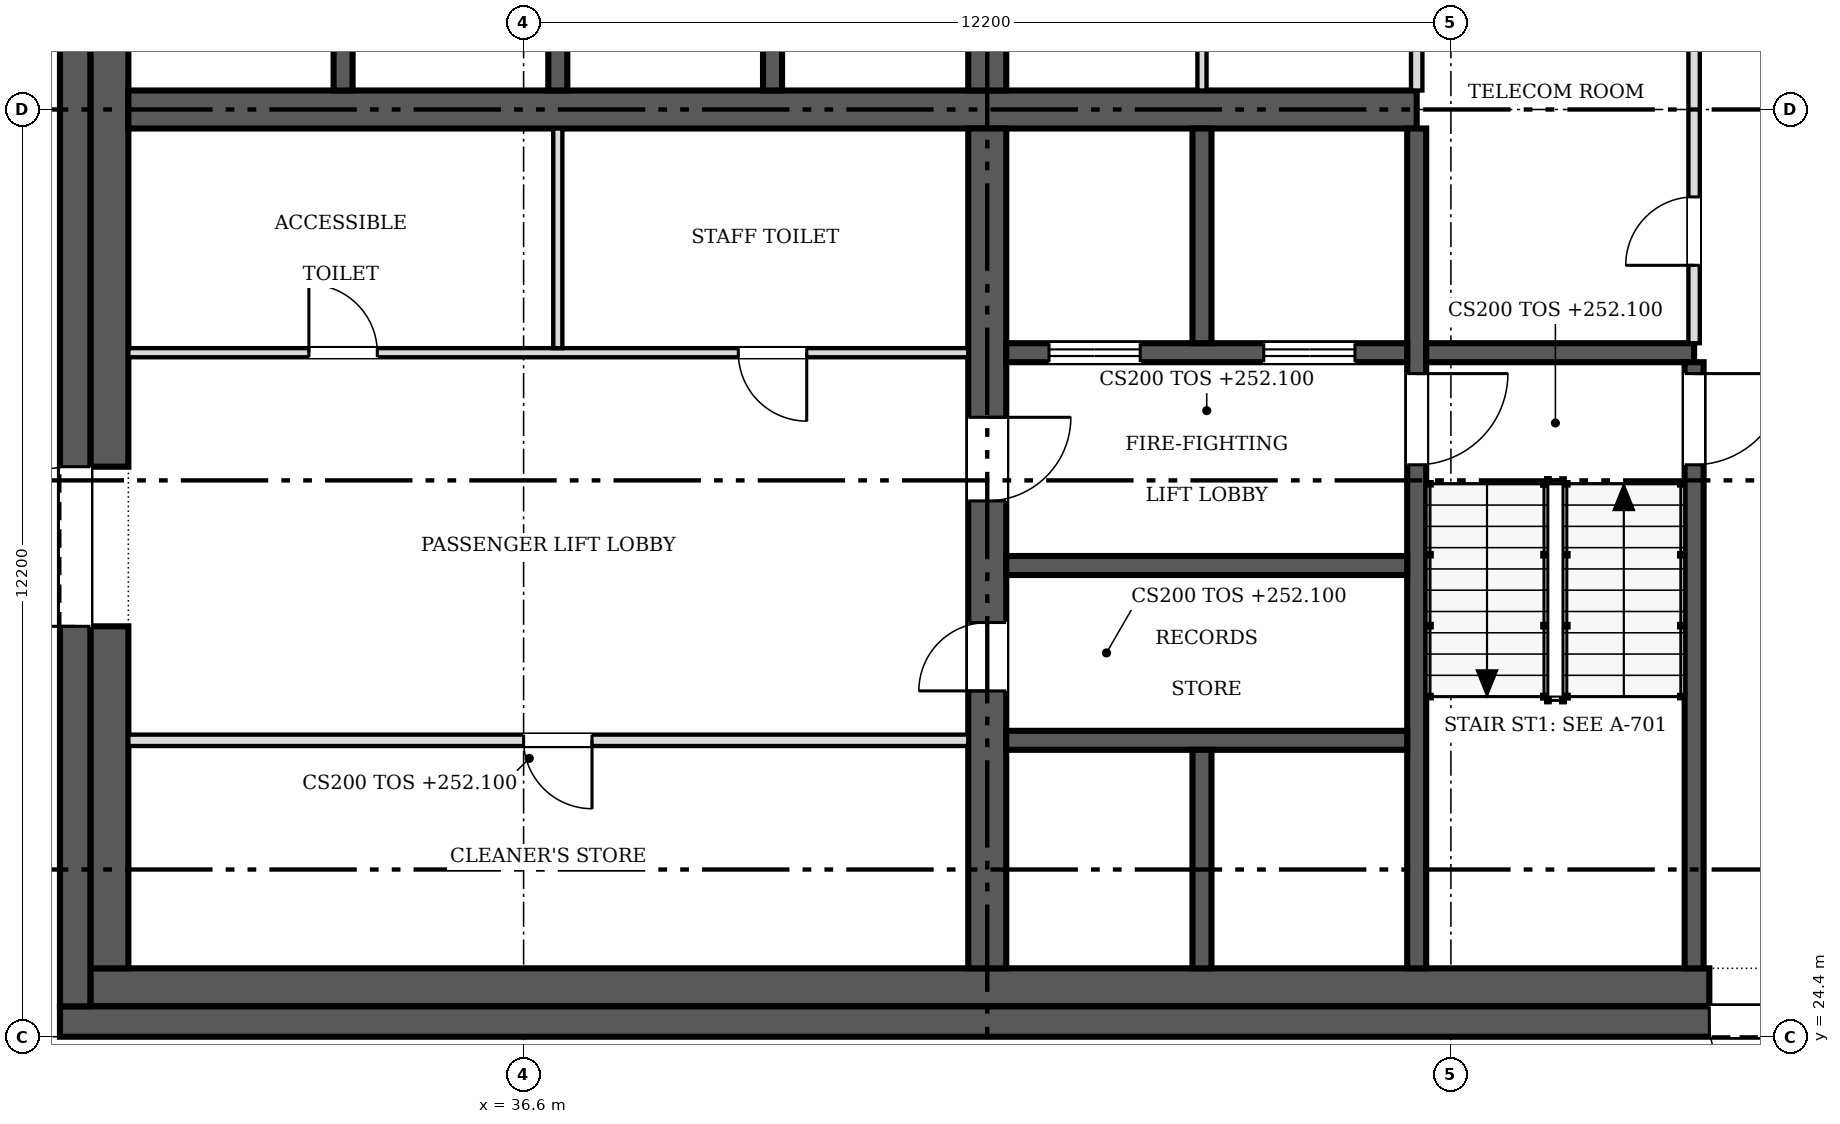
"""IFC4 building model, lengths in metres.
Left out: names, types, materials, properties, quantities, classifications, styles, units other than length and angle.
Written with IfcOpenShell. Run it as: python <this file> out.ifc"""

import sys

from ifc_helpers import new_model, si_unit, direction, frame, frame_2d, origin, place, context, subcontext, project, spatial, rectangle, extrude, source, transform, mapped, element, fill, save


model = new_model("IFC4")
c1 = context("Model", 3, precision=1e-05, world=origin(), true_north=direction((0.0, 1.0)))
c2 = subcontext(c1, "Body", "Model", "MODEL_VIEW")
j1 = project(units=[si_unit("LENGTHUNIT", "METRE"), si_unit("PLANEANGLEUNIT", "RADIAN")], contexts=[c1])
p1 = place(None, origin())
s1 = spatial("IfcSite", under=j1, at=p1, CompositionType="ELEMENT")
p2 = place(p1, origin())
s2 = spatial("IfcBuilding", under=s1, at=p2, CompositionType="ELEMENT")
p3 = place(p2, frame((0.0, 0.0, 252.1)))
s3 = spatial("IfcBuildingStorey", under=s2, at=p3, CompositionType="ELEMENT", Elevation=252.1)
p4 = place(p3, frame((54.9, 24.6, 0.0), z_axis=(0.0, 0.0, 1.0), x_axis=(-1.0, 0.0, 0.0)))
e1 = element("IfcWall", 1, at=p4, inside=s3, PredefinedType="SHEAR", context=c2, shape_type="SweptSolid", body=[
    extrude(rectangle(XDim=24.4, YDim=0.4, at=frame_2d((12.2, 0.0))), origin(), (0.0, 0.0, 1.0), 3.8),
])
m1 = source(origin(), c2, "Body", "SweptSolid", [
    extrude(rectangle(XDim=1.2, YDim=2.1, at=frame_2d((0.6, 1.05))), frame((0.0, 0.21, 0.0), z_axis=(0.0, -1.0, 0.0), x_axis=(1.0, 0.0, 0.0)), (0.0, 0.0, 1.0), 0.42),
])
p5 = place(p4, frame((1.5, 0.0, 0.0)))
e2 = element("IfcOpeningElement", 2, at=p5, cuts=e1, PredefinedType="OPENING", context=c2, shape_type="MappedRepresentation", body=[
    mapped(m1, transform((0.0, 0.0, 0.0), scale=1.0)),
])
p6 = place(p3, frame((30.7, 24.8, 0.0), z_axis=(0.0, 0.0, 1.0), x_axis=(0.0, 1.0, 0.0)))
e3 = element("IfcWall", 3, at=p6, inside=s3, PredefinedType="SHEAR", context=c2, shape_type="SweptSolid", body=[
    extrude(rectangle(XDim=23.6, YDim=0.4, at=frame_2d((11.8, 0.0))), origin(), (0.0, 0.0, 1.0), 3.8),
])
m2 = source(origin(), c2, "Body", "SweptSolid", [
    extrude(rectangle(XDim=2.1, YDim=2.4, at=frame_2d((1.05, 1.2))), frame((0.0, 0.21, 0.0), z_axis=(0.0, -1.0, 0.0), x_axis=(1.0, 0.0, 0.0)), (0.0, 0.0, 1.0), 0.42),
])
p7 = place(p6, frame((5.0, 0.0, 0.0)))
e4 = element("IfcOpeningElement", 4, at=p7, cuts=e3, PredefinedType="OPENING", context=c2, shape_type="MappedRepresentation", body=[
    mapped(m2, transform((0.0, 0.0, 0.0), scale=1.0)),
])
p8 = place(p6, frame((16.5, 0.0, 0.0)))
e5 = element("IfcOpeningElement", 5, at=p8, cuts=e3, PredefinedType="OPENING", context=c2, shape_type="MappedRepresentation", body=[
    mapped(m2, transform((0.0, 0.0, 0.0), scale=1.0)),
])
p9 = place(p3, frame((30.9, 25.05, 0.0), z_axis=(0.0, 0.0, 1.0), x_axis=(1.0, 0.0, 0.0)))
e6 = element("IfcWall", 6, at=p9, inside=s3, PredefinedType="SOLIDWALL", context=c2, shape_type="SweptSolid", body=[
    extrude(rectangle(XDim=21.3, YDim=0.5, at=frame_2d((10.65, 0.0))), origin(), (0.0, 0.0, 1.0), 3.8),
])
p10 = place(p3, frame((31.15, 25.3, 0.0), z_axis=(0.0, 0.0, 1.0), x_axis=(0.0, 1.0, 0.0)))
e7 = element("IfcWall", 7, at=p10, inside=s3, PredefinedType="SOLIDWALL", context=c2, shape_type="SweptSolid", body=[
    extrude(rectangle(XDim=4.5, YDim=0.5, at=frame_2d((2.25, 0.0))), origin(), (0.0, 0.0, 1.0), 3.8),
])
p11 = place(p3, frame((31.15, 31.9, 0.0), z_axis=(0.0, 0.0, 1.0), x_axis=(0.0, 1.0, 0.0)))
e8 = element("IfcWall", 8, at=p11, inside=s3, PredefinedType="SOLIDWALL", context=c2, shape_type="SweptSolid", body=[
    extrude(rectangle(XDim=9.4, YDim=0.5, at=frame_2d((4.7, 0.0))), origin(), (0.0, 0.0, 1.0), 3.8),
])
p12 = place(p3, frame((31.4, 36.6, 0.0), z_axis=(0.0, 0.0, 1.0), x_axis=(1.0, 0.0, 0.0)))
e9 = element("IfcWall", 9, at=p12, inside=s3, PredefinedType="SHEAR", context=c2, shape_type="SweptSolid", body=[
    extrude(rectangle(XDim=16.95, YDim=0.5, at=frame_2d((8.475, 0.0))), origin(), (0.0, 0.0, 1.0), 3.8),
])
p13 = place(p3, frame((42.7, 36.35, 0.0), z_axis=(0.0, 0.0, 1.0), x_axis=(0.0, -1.0, 0.0)))
e10 = element("IfcWall", 10, at=p13, inside=s3, PredefinedType="SHEAR", context=c2, shape_type="SweptSolid", body=[
    extrude(rectangle(XDim=11.05, YDim=0.5, at=frame_2d((5.525, 0.0))), origin(), (0.0, 0.0, 1.0), 3.8),
])
m3 = source(origin(), c2, "Body", "SweptSolid", [
    extrude(rectangle(XDim=0.9, YDim=2.1, at=frame_2d((0.45, 1.05))), frame((0.0, 0.26, 0.0), z_axis=(0.0, -1.0, 0.0), x_axis=(1.0, 0.0, 0.0)), (0.0, 0.0, 1.0), 0.52),
])
p14 = place(p13, frame((6.5, 0.0, 0.0)))
e11 = element("IfcOpeningElement", 11, at=p14, cuts=e10, PredefinedType="OPENING", context=c2, shape_type="MappedRepresentation", body=[
    mapped(m3, transform((0.0, 0.0, 0.0), scale=1.0)),
])
m4 = source(origin(), c2, "Body", "SweptSolid", [
    extrude(rectangle(XDim=1.1, YDim=2.1, at=frame_2d((0.55, 1.05))), frame((0.0, 0.26, 0.0), z_axis=(0.0, -1.0, 0.0), x_axis=(1.0, 0.0, 0.0)), (0.0, 0.0, 1.0), 0.52),
])
p15 = place(p13, frame((3.8, 0.0, 0.0)))
e12 = element("IfcOpeningElement", 12, at=p15, cuts=e10, PredefinedType="OPENING", context=c2, shape_type="MappedRepresentation", body=[
    mapped(m4, transform((0.0, 0.0, 0.0), scale=1.0)),
])
p16 = place(p3, frame((42.7, 36.85, 0.0), z_axis=(0.0, 0.0, 1.0), x_axis=(0.0, 1.0, 0.0)))
e13 = element("IfcWall", 13, at=p16, inside=s3, PredefinedType="SHEAR", context=c2, shape_type="SweptSolid", body=[
    extrude(rectangle(XDim=2.95, YDim=0.5, at=frame_2d((1.475, 0.0))), origin(), (0.0, 0.0, 1.0), 3.8),
])
p17 = place(p3, frame((48.35, 36.35, 0.0), z_axis=(0.0, 0.0, 1.0), x_axis=(0.0, -1.0, 0.0)))
e14 = element("IfcWall", 14, at=p17, inside=s3, PredefinedType="SOLIDWALL", context=c2, shape_type="SweptSolid", body=[
    extrude(rectangle(XDim=11.05, YDim=0.25, at=frame_2d((5.525, 0.0))), origin(), (0.0, 0.0, 1.0), 3.8),
])
m5 = source(origin(), c2, "Body", "SweptSolid", [
    extrude(rectangle(XDim=1.2, YDim=2.1, at=frame_2d((0.6, 1.05))), frame((0.0, 0.135, 0.0), z_axis=(0.0, -1.0, 0.0), x_axis=(1.0, 0.0, 0.0)), (0.0, 0.0, 1.0), 0.27),
])
p18 = place(p17, frame((3.225, 0.0, 0.0)))
e15 = element("IfcOpeningElement", 15, at=p18, cuts=e14, PredefinedType="OPENING", context=c2, shape_type="MappedRepresentation", body=[
    mapped(m5, transform((0.0, 0.0, 0.0), scale=1.0)),
])
p19 = place(p3, frame((48.225, 33.4, 0.0), z_axis=(0.0, 0.0, 1.0), x_axis=(-1.0, 0.0, 0.0)))
e16 = element("IfcWall", 16, at=p19, inside=s3, PredefinedType="SOLIDWALL", context=c2, shape_type="SweptSolid", body=[
    extrude(rectangle(XDim=5.275, YDim=0.25, at=frame_2d((2.638, 0.0))), origin(), (0.0, 0.0, 1.0), 3.8),
])
p20 = place(p19, frame((3.512, 0.0, 0.0)))
e17 = element("IfcOpeningElement", 17, at=p20, cuts=e16, PredefinedType="OPENING", context=c2, shape_type="MappedRepresentation", body=[
    mapped(m5, transform((0.0, 0.0, 0.0), scale=1.0)),
])
p21 = place(p19, frame((0.688, 0.0, 0.0)))
e18 = element("IfcOpeningElement", 18, at=p21, cuts=e16, PredefinedType="OPENING", context=c2, shape_type="MappedRepresentation", body=[
    mapped(m5, transform((0.0, 0.0, 0.0), scale=1.0)),
])
p22 = place(p3, frame((48.475, 33.4, 0.0), z_axis=(0.0, 0.0, 1.0), x_axis=(1.0, 0.0, 0.0)))
e19 = element("IfcWall", 19, at=p22, inside=s3, PredefinedType="SOLIDWALL", context=c2, shape_type="SweptSolid", body=[
    extrude(rectangle(XDim=3.525, YDim=0.25, at=frame_2d((1.762, 0.0))), origin(), (0.0, 0.0, 1.0), 3.8),
])
p23 = place(p3, frame((52.0, 25.3, 0.0), z_axis=(0.0, 0.0, 1.0), x_axis=(0.0, 1.0, 0.0)))
e20 = element("IfcWall", 20, at=p23, inside=s3, PredefinedType="SOLIDWALL", context=c2, shape_type="SweptSolid", body=[
    extrude(rectangle(XDim=7.975, YDim=0.25, at=frame_2d((3.987, 0.0))), origin(), (0.0, 0.0, 1.0), 3.8),
])
p24 = place(p23, frame((6.625, 0.0, 0.0)))
e21 = element("IfcOpeningElement", 21, at=p24, cuts=e20, PredefinedType="OPENING", context=c2, shape_type="MappedRepresentation", body=[
    mapped(m5, transform((0.0, 0.0, 0.0), scale=1.0)),
])
for number, where, z_axis, x_axis in (
    (22, (42.95, 28.3, 0.0), (0.0, 0.0, 1.0), (1.0, 0.0, 0.0)),
    (23, (42.95, 30.6, 0.0), (0.0, 0.0, 1.0), (1.0, 0.0, 0.0)),
):
    element("IfcWall", number, at=place(p3, frame(where, z_axis=z_axis, x_axis=x_axis)), inside=s3, PredefinedType="SOLIDWALL", context=c2, shape_type="SweptSolid", body=[
        extrude(rectangle(XDim=5.275, YDim=0.25, at=frame_2d((2.638, 0.0))), origin(), (0.0, 0.0, 1.0), 3.8),
    ])
for number, where, z_axis, x_axis in (
    (24, (34.225, 36.85, 0.0), (0.0, 0.0, 1.0), (0.0, 1.0, 0.0)),
    (25, (37.05, 36.85, 0.0), (0.0, 0.0, 1.0), (0.0, 1.0, 0.0)),
    (26, (39.875, 36.85, 0.0), (0.0, 0.0, 1.0), (0.0, 1.0, 0.0)),
):
    element("IfcWall", number, at=place(p3, frame(where, z_axis=z_axis, x_axis=x_axis)), inside=s3, PredefinedType="SOLIDWALL", context=c2, shape_type="SweptSolid", body=[
        extrude(rectangle(XDim=2.825, YDim=0.25, at=frame_2d((1.413, 0.0))), origin(), (0.0, 0.0, 1.0), 3.8),
    ])
p25 = place(p3, frame((45.525, 33.525, 0.0), z_axis=(0.0, 0.0, 1.0), x_axis=(0.0, 1.0, 0.0)))
e27 = element("IfcWall", 27, at=p25, inside=s3, PredefinedType="SOLIDWALL", context=c2, shape_type="SweptSolid", body=[
    extrude(rectangle(XDim=2.825, YDim=0.25, at=frame_2d((1.413, 0.0))), origin(), (0.0, 0.0, 1.0), 3.8),
])
p26 = place(p3, frame((45.525, 25.3, 0.0), z_axis=(0.0, 0.0, 1.0), x_axis=(0.0, 1.0, 0.0)))
e28 = element("IfcWall", 28, at=p26, inside=s3, PredefinedType="SOLIDWALL", context=c2, shape_type="SweptSolid", body=[
    extrude(rectangle(XDim=2.875, YDim=0.25, at=frame_2d((1.438, 0.0))), origin(), (0.0, 0.0, 1.0), 3.8),
])
p27 = place(p3, frame((42.45, 28.3, 0.0), z_axis=(0.0, 0.0, 1.0), x_axis=(-1.0, 0.0, 0.0)))
e29 = element("IfcWall", 29, at=p27, inside=s3, PredefinedType="PARTITIONING", context=c2, shape_type="SweptSolid", body=[
    extrude(rectangle(XDim=11.05, YDim=0.15, at=frame_2d((5.525, 0.0))), origin(), (0.0, 0.0, 1.0), 3.6),
])
m6 = source(origin(), c2, "Body", "SweptSolid", [
    extrude(rectangle(XDim=0.9, YDim=2.1, at=frame_2d((0.45, 1.05))), frame((0.0, 0.085, 0.0), z_axis=(0.0, -1.0, 0.0), x_axis=(1.0, 0.0, 0.0)), (0.0, 0.0, 1.0), 0.17),
])
p28 = place(p27, frame((4.95, 0.0, 0.0)))
e30 = element("IfcOpeningElement", 30, at=p28, cuts=e29, PredefinedType="OPENING", context=c2, shape_type="MappedRepresentation", body=[
    mapped(m6, transform((0.0, 0.0, 0.0), scale=1.0)),
])
p29 = place(p3, frame((31.4, 33.4, 0.0), z_axis=(0.0, 0.0, 1.0), x_axis=(1.0, 0.0, 0.0)))
e31 = element("IfcWall", 31, at=p29, inside=s3, PredefinedType="PARTITIONING", context=c2, shape_type="SweptSolid", body=[
    extrude(rectangle(XDim=11.05, YDim=0.12, at=frame_2d((5.525, 0.0))), origin(), (0.0, 0.0, 1.0), 3.6),
])
m7 = source(origin(), c2, "Body", "SweptSolid", [
    extrude(rectangle(XDim=0.9, YDim=2.1, at=frame_2d((0.45, 1.05))), frame((0.0, 0.07, 0.0), z_axis=(0.0, -1.0, 0.0), x_axis=(1.0, 0.0, 0.0)), (0.0, 0.0, 1.0), 0.14),
])
p30 = place(p29, frame((2.375, 0.0, 0.0)))
e32 = element("IfcOpeningElement", 32, at=p30, cuts=e31, PredefinedType="OPENING", context=c2, shape_type="MappedRepresentation", body=[
    mapped(m7, transform((0.0, 0.0, 0.0), scale=1.0)),
])
p31 = place(p29, frame((8.025, 0.0, 0.0)))
e33 = element("IfcOpeningElement", 33, at=p31, cuts=e31, PredefinedType="OPENING", context=c2, shape_type="MappedRepresentation", body=[
    mapped(m7, transform((0.0, 0.0, 0.0), scale=1.0)),
])
p32 = place(p3, frame((52.0, 33.525, 0.0), z_axis=(0.0, 0.0, 1.0), x_axis=(0.0, 1.0, 0.0)))
e34 = element("IfcWall", 34, at=p32, inside=s3, PredefinedType="PARTITIONING", context=c2, shape_type="SweptSolid", body=[
    extrude(rectangle(XDim=6.275, YDim=0.15, at=frame_2d((3.138, 0.0))), origin(), (0.0, 0.0, 1.0), 3.6),
])
p33 = place(p32, frame((1.025, 0.0, 0.0)))
e35 = element("IfcOpeningElement", 35, at=p33, cuts=e34, PredefinedType="OPENING", context=c2, shape_type="MappedRepresentation", body=[
    mapped(m6, transform((0.0, 0.0, 0.0), scale=1.0)),
])
p34 = place(p3, frame((45.525, 36.85, 0.0), z_axis=(0.0, 0.0, 1.0), x_axis=(0.0, 1.0, 0.0)))
e36 = element("IfcWall", 36, at=p34, inside=s3, PredefinedType="PARTITIONING", context=c2, shape_type="SweptSolid", body=[
    extrude(rectangle(XDim=2.89, YDim=0.12, at=frame_2d((1.445, 0.0))), origin(), (0.0, 0.0, 1.0), 3.6),
])
p35 = place(p3, frame((48.35, 36.85, 0.0), z_axis=(0.0, 0.0, 1.0), x_axis=(0.0, 1.0, 0.0)))
e37 = element("IfcWall", 37, at=p35, inside=s3, PredefinedType="PARTITIONING", context=c2, shape_type="SweptSolid", body=[
    extrude(rectangle(XDim=2.95, YDim=0.15, at=frame_2d((1.475, 0.0))), origin(), (0.0, 0.0, 1.0), 3.6),
])
p36 = place(p3, frame((37.05, 33.46, 0.0), z_axis=(0.0, 0.0, 1.0), x_axis=(0.0, 1.0, 0.0)))
e38 = element("IfcWall", 38, at=p36, inside=s3, PredefinedType="PARTITIONING", context=c2, shape_type="SweptSolid", body=[
    extrude(rectangle(XDim=2.89, YDim=0.12, at=frame_2d((1.445, 0.0))), origin(), (0.0, 0.0, 1.0), 3.6),
])
m8 = source(origin(), c2, "Body", "SweptSolid", [
    extrude(rectangle(XDim=1.2, YDim=2.1, at=frame_2d((0.6, 1.05))), frame((0.0, 0.025, 0.0), z_axis=(0.0, -1.0, 0.0), x_axis=(1.0, 0.0, 0.0)), (0.0, 0.0, 1.0), 0.05),
])
p37 = place(p5, origin())
e39 = element("IfcDoor", 39, at=p37, inside=s3, OperationType="SINGLE_SWING_LEFT", PredefinedType="DOOR", context=c2, shape_type="MappedRepresentation", body=[
    mapped(m8, transform((0.0, 0.0, 0.0), scale=1.0)),
])
fill(e2, e39)
m9 = source(origin(), c2, "Body", "SweptSolid", [
    extrude(rectangle(XDim=2.1, YDim=2.4, at=frame_2d((1.05, 1.2))), frame((0.0, 0.025, 0.0), z_axis=(0.0, -1.0, 0.0), x_axis=(1.0, 0.0, 0.0)), (0.0, 0.0, 1.0), 0.05),
])
p38 = place(p7, origin())
e40 = element("IfcDoor", 40, at=p38, inside=s3, OperationType="DOUBLE_DOOR_SINGLE_SWING", PredefinedType="DOOR", context=c2, shape_type="MappedRepresentation", body=[
    mapped(m9, transform((0.0, 0.0, 0.0), scale=1.0)),
])
fill(e4, e40)
m10 = source(origin(), c2, "Body", "SweptSolid", [
    extrude(rectangle(XDim=0.9, YDim=2.1, at=frame_2d((0.45, 1.05))), frame((0.0, 0.025, 0.0), z_axis=(0.0, -1.0, 0.0), x_axis=(1.0, 0.0, 0.0)), (0.0, 0.0, 1.0), 0.05),
])
p39 = place(p14, origin())
e41 = element("IfcDoor", 41, at=p39, inside=s3, OperationType="SINGLE_SWING_RIGHT", PredefinedType="DOOR", context=c2, shape_type="MappedRepresentation", body=[
    mapped(m10, transform((0.0, 0.0, 0.0), scale=1.0)),
])
fill(e11, e41)
m11 = source(origin(), c2, "Body", "SweptSolid", [
    extrude(rectangle(XDim=1.1, YDim=2.1, at=frame_2d((0.55, 1.05))), frame((0.0, 0.025, 0.0), z_axis=(0.0, -1.0, 0.0), x_axis=(1.0, 0.0, 0.0)), (0.0, 0.0, 1.0), 0.05),
])
p40 = place(p15, origin())
e42 = element("IfcDoor", 42, at=p40, inside=s3, OperationType="SINGLE_SWING_LEFT", PredefinedType="DOOR", context=c2, shape_type="MappedRepresentation", body=[
    mapped(m11, transform((0.0, 0.0, 0.0), scale=1.0)),
])
fill(e12, e42)
p41 = place(p18, origin())
e43 = element("IfcDoor", 43, at=p41, inside=s3, OperationType="SINGLE_SWING_LEFT", PredefinedType="DOOR", context=c2, shape_type="MappedRepresentation", body=[
    mapped(m8, transform((0.0, 0.0, 0.0), scale=1.0)),
])
fill(e15, e43)
p42 = place(p20, origin())
e44 = element("IfcDoor", 44, at=p42, inside=s3, OperationType="DOUBLE_DOOR_SLIDING", PredefinedType="DOOR", context=c2, shape_type="MappedRepresentation", body=[
    mapped(m8, transform((0.0, 0.0, 0.0), scale=1.0)),
])
fill(e17, e44)
p43 = place(p21, origin())
e45 = element("IfcDoor", 45, at=p43, inside=s3, OperationType="DOUBLE_DOOR_SLIDING", PredefinedType="DOOR", context=c2, shape_type="MappedRepresentation", body=[
    mapped(m8, transform((0.0, 0.0, 0.0), scale=1.0)),
])
fill(e18, e45)
p44 = place(p24, origin())
e46 = element("IfcDoor", 46, at=p44, inside=s3, OperationType="SINGLE_SWING_RIGHT", PredefinedType="DOOR", context=c2, shape_type="MappedRepresentation", body=[
    mapped(m8, transform((0.0, 0.0, 0.0), scale=1.0)),
])
fill(e21, e46)
p45 = place(p28, origin())
e47 = element("IfcDoor", 47, at=p45, inside=s3, OperationType="SINGLE_SWING_LEFT", PredefinedType="DOOR", context=c2, shape_type="MappedRepresentation", body=[
    mapped(m10, transform((0.0, 0.0, 0.0), scale=1.0)),
])
fill(e30, e47)
p46 = place(p30, origin())
e48 = element("IfcDoor", 48, at=p46, inside=s3, OperationType="SINGLE_SWING_LEFT", PredefinedType="DOOR", context=c2, shape_type="MappedRepresentation", body=[
    mapped(m10, transform((0.0, 0.0, 0.0), scale=1.0)),
])
fill(e32, e48)
p47 = place(p31, origin())
e49 = element("IfcDoor", 49, at=p47, inside=s3, OperationType="SINGLE_SWING_RIGHT", PredefinedType="DOOR", context=c2, shape_type="MappedRepresentation", body=[
    mapped(m10, transform((0.0, 0.0, 0.0), scale=1.0)),
])
fill(e33, e49)
p48 = place(p33, origin())
e50 = element("IfcDoor", 50, at=p48, inside=s3, OperationType="SINGLE_SWING_LEFT", PredefinedType="DOOR", context=c2, shape_type="MappedRepresentation", body=[
    mapped(m10, transform((0.0, 0.0, 0.0), scale=1.0)),
])
fill(e35, e50)
save(model, sys.argv[1])
